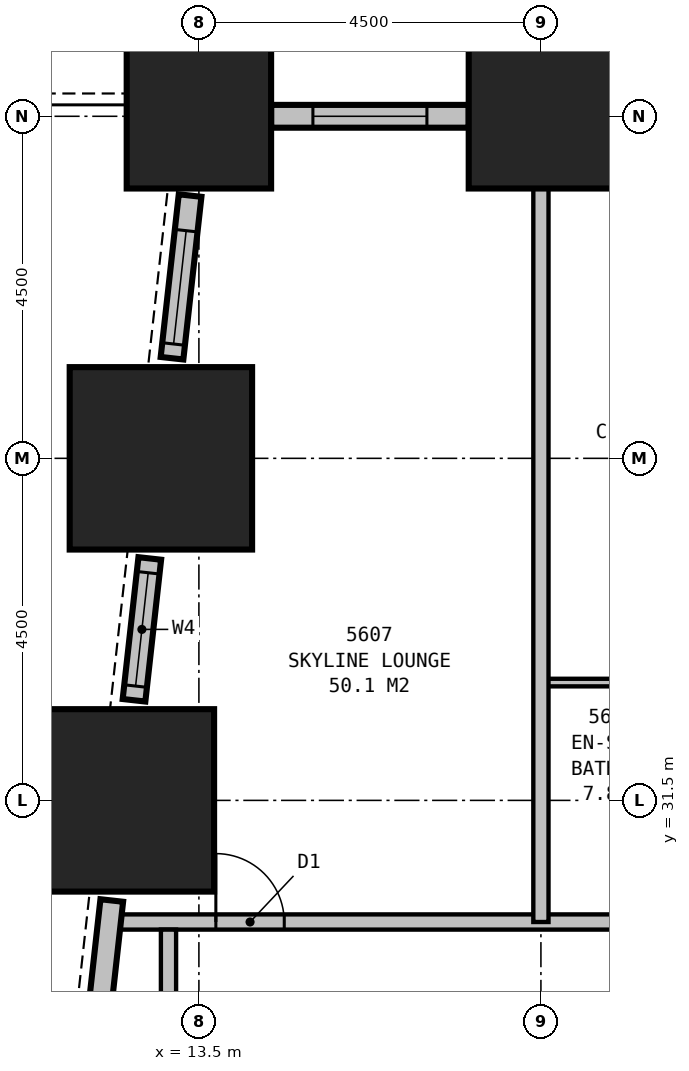
"""IFC4 building model, lengths in metres.
Left out: names, types, materials, properties, quantities, classifications, styles, units other than length and angle.
Written with IfcOpenShell. Run it as: python <this file> out.ifc"""

import sys

from ifc_helpers import new_model, si_unit, direction, frame, frame_2d, origin, origin_2d, place, context, subcontext, project, spatial, rectangle, extrude, element, fill, save


model = new_model("IFC4")
c1 = context("Model", 3, precision=1e-05, world=origin(), true_north=direction((0.0, 1.0)))
c2 = subcontext(c1, "Body", "Model", "MODEL_VIEW")
j1 = project(units=[si_unit("LENGTHUNIT", "METRE"), si_unit("PLANEANGLEUNIT", "RADIAN")], contexts=[c1])
p1 = place(None, origin())
s1 = spatial("IfcSite", under=j1, at=p1, CompositionType="ELEMENT")
p2 = place(p1, origin())
s2 = spatial("IfcBuilding", under=s1, at=p2, CompositionType="ELEMENT")
p3 = place(p2, frame((0.0, 0.0, 217.4)))
s3 = spatial("IfcBuildingStorey", under=s2, at=p3, CompositionType="ELEMENT", Elevation=217.4)
for number, where, z_axis, x_axis in (
    (1, (18.0, 40.5, 0.0), (0.0, 0.0, 1.0), (1.0, 0.0, 0.0)),
    (2, (13.5, 40.5, 0.0), (0.0, 0.0, 1.0), (1.0, 0.0, 0.0)),
):
    element("IfcColumn", number, at=place(p3, frame(where, z_axis=z_axis, x_axis=x_axis)), inside=s3, PredefinedType="COLUMN", context=c2, shape_type="SweptSolid", body=[
        extrude(rectangle(XDim=1.9, YDim=1.9, at=origin_2d()), origin(), (0.0, 0.0, 1.0), 3.9),
    ])
for number, where, z_axis, x_axis in (
    (3, (13.0, 36.0, 0.0), (0.0, 0.0, 1.0), (1.0, 0.0, 0.0)),
    (4, (12.5, 31.5, 0.0), (0.0, 0.0, 1.0), (1.0, 0.0, 0.0)),
):
    element("IfcColumn", number, at=place(p3, frame(where, z_axis=z_axis, x_axis=x_axis)), inside=s3, PredefinedType="COLUMN", context=c2, shape_type="SweptSolid", body=[
        extrude(rectangle(XDim=2.4, YDim=2.4, at=origin_2d()), origin(), (0.0, 0.0, 1.0), 3.9),
    ])
p4 = place(p3, frame((17.05, 40.5, 0.0), z_axis=(0.0, 0.0, 1.0), x_axis=(-1.0, 0.0, 0.0)))
e5 = element("IfcWall", 5, at=p4, inside=s3, PredefinedType="STANDARD", context=c2, shape_type="SweptSolid", body=[
    extrude(rectangle(XDim=2.6, YDim=0.3, at=frame_2d((1.3, 0.0))), origin(), (0.0, 0.0, 1.0), 2.15),
])
p5 = place(p4, frame((0.55, 0.0, 0.5)))
e6 = element("IfcOpeningElement", 6, at=p5, cuts=e5, PredefinedType="OPENING", context=c2, shape_type="SweptSolid", body=[
    extrude(rectangle(XDim=1.5, YDim=1.5, at=frame_2d((0.75, 0.75))), frame((0.0, 0.16, 0.0), z_axis=(0.0, -1.0, 0.0), x_axis=(1.0, 0.0, 0.0)), (0.0, 0.0, 1.0), 0.32),
])
p6 = place(p3, frame((13.384, 39.457, 0.0), z_axis=(0.0, 0.0, 1.0), x_axis=(-0.110431526075, -0.993883734674, 0.0)))
e7 = element("IfcWall", 7, at=p6, inside=s3, PredefinedType="STANDARD", context=c2, shape_type="SweptSolid", body=[
    extrude(rectangle(XDim=2.153, YDim=0.3, at=frame_2d((1.077, 0.0))), origin(), (0.0, 0.0, 1.0), 2.15),
])
p7 = place(p6, frame((0.465, 0.0, 0.5)))
e8 = element("IfcOpeningElement", 8, at=p7, cuts=e7, PredefinedType="OPENING", context=c2, shape_type="SweptSolid", body=[
    extrude(rectangle(XDim=1.5, YDim=1.5, at=frame_2d((0.75, 0.75))), frame((0.0, 0.16, 0.0), z_axis=(0.0, -1.0, 0.0), x_axis=(1.0, 0.0, 0.0)), (0.0, 0.0, 1.0), 0.32),
])
p8 = place(p3, frame((12.854, 34.683, 0.0), z_axis=(0.0, 0.0, 1.0), x_axis=(-0.110545718915, -0.993871039939, 0.0)))
e9 = element("IfcWall", 9, at=p8, inside=s3, PredefinedType="STANDARD", context=c2, shape_type="SweptSolid", body=[
    extrude(rectangle(XDim=1.877, YDim=0.3, at=frame_2d((0.938, 0.0))), origin(), (0.0, 0.0, 1.0), 2.15),
])
p9 = place(p8, frame((0.189, 0.0, 0.5)))
e10 = element("IfcOpeningElement", 10, at=p9, cuts=e9, PredefinedType="OPENING", context=c2, shape_type="SweptSolid", body=[
    extrude(rectangle(XDim=1.5, YDim=1.5, at=frame_2d((0.75, 0.75))), frame((0.0, 0.16, 0.0), z_axis=(0.0, -1.0, 0.0), x_axis=(1.0, 0.0, 0.0)), (0.0, 0.0, 1.0), 0.32),
])
p10 = place(p3, frame((12.354, 30.183, 0.0), z_axis=(0.0, 0.0, 1.0), x_axis=(-0.110431526075, -0.993883734674, 0.0)))
e11 = element("IfcWall", 11, at=p10, inside=s3, PredefinedType="STANDARD", context=c2, shape_type="SweptSolid", body=[
    extrude(rectangle(XDim=2.153, YDim=0.3, at=frame_2d((1.077, 0.0))), origin(), (0.0, 0.0, 1.0), 2.15),
])
p11 = place(p3, frame((12.473, 29.9, 0.0), z_axis=(0.0, 0.0, 1.0), x_axis=(1.0, 0.0, 0.0)))
e12 = element("IfcWall", 12, at=p11, inside=s3, PredefinedType="PARTITIONING", context=c2, shape_type="SweptSolid", body=[
    extrude(rectangle(XDim=25.827, YDim=0.2, at=frame_2d((12.914, 0.0))), origin(), (0.0, 0.0, 1.0), 3.65),
])
p12 = place(p11, frame((1.25, 0.0, 0.0)))
e13 = element("IfcOpeningElement", 13, at=p12, cuts=e12, PredefinedType="OPENING", context=c2, shape_type="SweptSolid", body=[
    extrude(rectangle(XDim=0.9, YDim=2.1, at=frame_2d((0.45, 1.05))), frame((0.0, 0.11, 0.0), z_axis=(0.0, -1.0, 0.0), x_axis=(1.0, 0.0, 0.0)), (0.0, 0.0, 1.0), 0.22),
])
p13 = place(p11, frame((8.677, 0.0, 0.0)))
e14 = element("IfcOpeningElement", 14, at=p13, cuts=e12, PredefinedType="OPENING", context=c2, shape_type="SweptSolid", body=[
    extrude(rectangle(XDim=0.9, YDim=2.1, at=frame_2d((0.45, 1.05))), frame((0.0, 0.11, 0.0), z_axis=(0.0, -1.0, 0.0), x_axis=(1.0, 0.0, 0.0)), (0.0, 0.0, 1.0), 0.22),
])
p14 = place(p11, frame((12.777, 0.0, 0.0)))
e15 = element("IfcOpeningElement", 15, at=p14, cuts=e12, PredefinedType="OPENING", context=c2, shape_type="SweptSolid", body=[
    extrude(rectangle(XDim=0.9, YDim=2.1, at=frame_2d((0.45, 1.05))), frame((0.0, 0.11, 0.0), z_axis=(0.0, -1.0, 0.0), x_axis=(1.0, 0.0, 0.0)), (0.0, 0.0, 1.0), 0.22),
])
p15 = place(p11, frame((22.177, 0.0, 0.0)))
e16 = element("IfcOpeningElement", 16, at=p15, cuts=e12, PredefinedType="OPENING", context=c2, shape_type="SweptSolid", body=[
    extrude(rectangle(XDim=0.9, YDim=2.1, at=frame_2d((0.45, 1.05))), frame((0.0, 0.11, 0.0), z_axis=(0.0, -1.0, 0.0), x_axis=(1.0, 0.0, 0.0)), (0.0, 0.0, 1.0), 0.22),
])
p16 = place(p11, frame((24.227, 0.0, 0.0)))
e17 = element("IfcOpeningElement", 17, at=p16, cuts=e12, PredefinedType="OPENING", context=c2, shape_type="SweptSolid", body=[
    extrude(rectangle(XDim=0.9, YDim=2.1, at=frame_2d((0.45, 1.05))), frame((0.0, 0.11, 0.0), z_axis=(0.0, -1.0, 0.0), x_axis=(1.0, 0.0, 0.0)), (0.0, 0.0, 1.0), 0.22),
])
p17 = place(p3, frame((13.1, 27.3, 0.0), z_axis=(0.0, 0.0, 1.0), x_axis=(0.0, 1.0, 0.0)))
e18 = element("IfcWall", 18, at=p17, inside=s3, PredefinedType="PARTITIONING", context=c2, shape_type="SweptSolid", body=[
    extrude(rectangle(XDim=2.5, YDim=0.2, at=frame_2d((1.25, 0.0))), origin(), (0.0, 0.0, 1.0), 2.15),
])
p18 = place(p3, frame((18.0, 29.9, 0.0), z_axis=(0.0, 0.0, 1.0), x_axis=(0.0, 1.0, 0.0)))
e19 = element("IfcWall", 19, at=p18, inside=s3, PredefinedType="PARTITIONING", context=c2, shape_type="SweptSolid", body=[
    extrude(rectangle(XDim=10.6, YDim=0.2, at=frame_2d((5.3, 0.0))), origin(), (0.0, 0.0, 1.0), 2.65),
])
p19 = place(p3, frame((18.0, 33.05, 0.0), z_axis=(0.0, 0.0, 1.0), x_axis=(1.0, 0.0, 0.0)))
e20 = element("IfcWall", 20, at=p19, inside=s3, PredefinedType="PLUMBINGWALL", context=c2, shape_type="SweptSolid", body=[
    extrude(rectangle(XDim=2.8, YDim=0.1, at=frame_2d((1.4, 0.0))), origin(), (0.0, 0.0, 1.0), 3.65),
])
p20 = place(p5, origin())
e21 = element("IfcWindow", 21, at=p20, inside=s3, PartitioningType="SINGLE_PANEL", PredefinedType="WINDOW", context=c2, shape_type="SweptSolid", body=[
    extrude(rectangle(XDim=1.5, YDim=1.5, at=frame_2d((0.75, 0.75))), frame((0.0, 0.03, 0.0), z_axis=(0.0, -1.0, 0.0), x_axis=(1.0, 0.0, 0.0)), (0.0, 0.0, 1.0), 0.06),
])
fill(e6, e21)
p21 = place(p7, origin())
e22 = element("IfcWindow", 22, at=p21, inside=s3, PartitioningType="SINGLE_PANEL", PredefinedType="WINDOW", context=c2, shape_type="SweptSolid", body=[
    extrude(rectangle(XDim=1.5, YDim=1.5, at=frame_2d((0.75, 0.75))), frame((0.0, 0.03, 0.0), z_axis=(0.0, -1.0, 0.0), x_axis=(1.0, 0.0, 0.0)), (0.0, 0.0, 1.0), 0.06),
])
fill(e8, e22)
p22 = place(p9, origin())
e23 = element("IfcWindow", 23, at=p22, inside=s3, PartitioningType="SINGLE_PANEL", PredefinedType="WINDOW", context=c2, shape_type="SweptSolid", body=[
    extrude(rectangle(XDim=1.5, YDim=1.5, at=frame_2d((0.75, 0.75))), frame((0.0, 0.03, 0.0), z_axis=(0.0, -1.0, 0.0), x_axis=(1.0, 0.0, 0.0)), (0.0, 0.0, 1.0), 0.06),
])
fill(e10, e23)
p23 = place(p12, origin())
e24 = element("IfcDoor", 24, at=p23, inside=s3, OperationType="SINGLE_SWING_LEFT", PredefinedType="DOOR", context=c2, shape_type="SweptSolid", body=[
    extrude(rectangle(XDim=0.9, YDim=2.1, at=frame_2d((0.45, 1.05))), frame((0.0, 0.025, 0.0), z_axis=(0.0, -1.0, 0.0), x_axis=(1.0, 0.0, 0.0)), (0.0, 0.0, 1.0), 0.05),
])
fill(e13, e24)
save(model, sys.argv[1])
